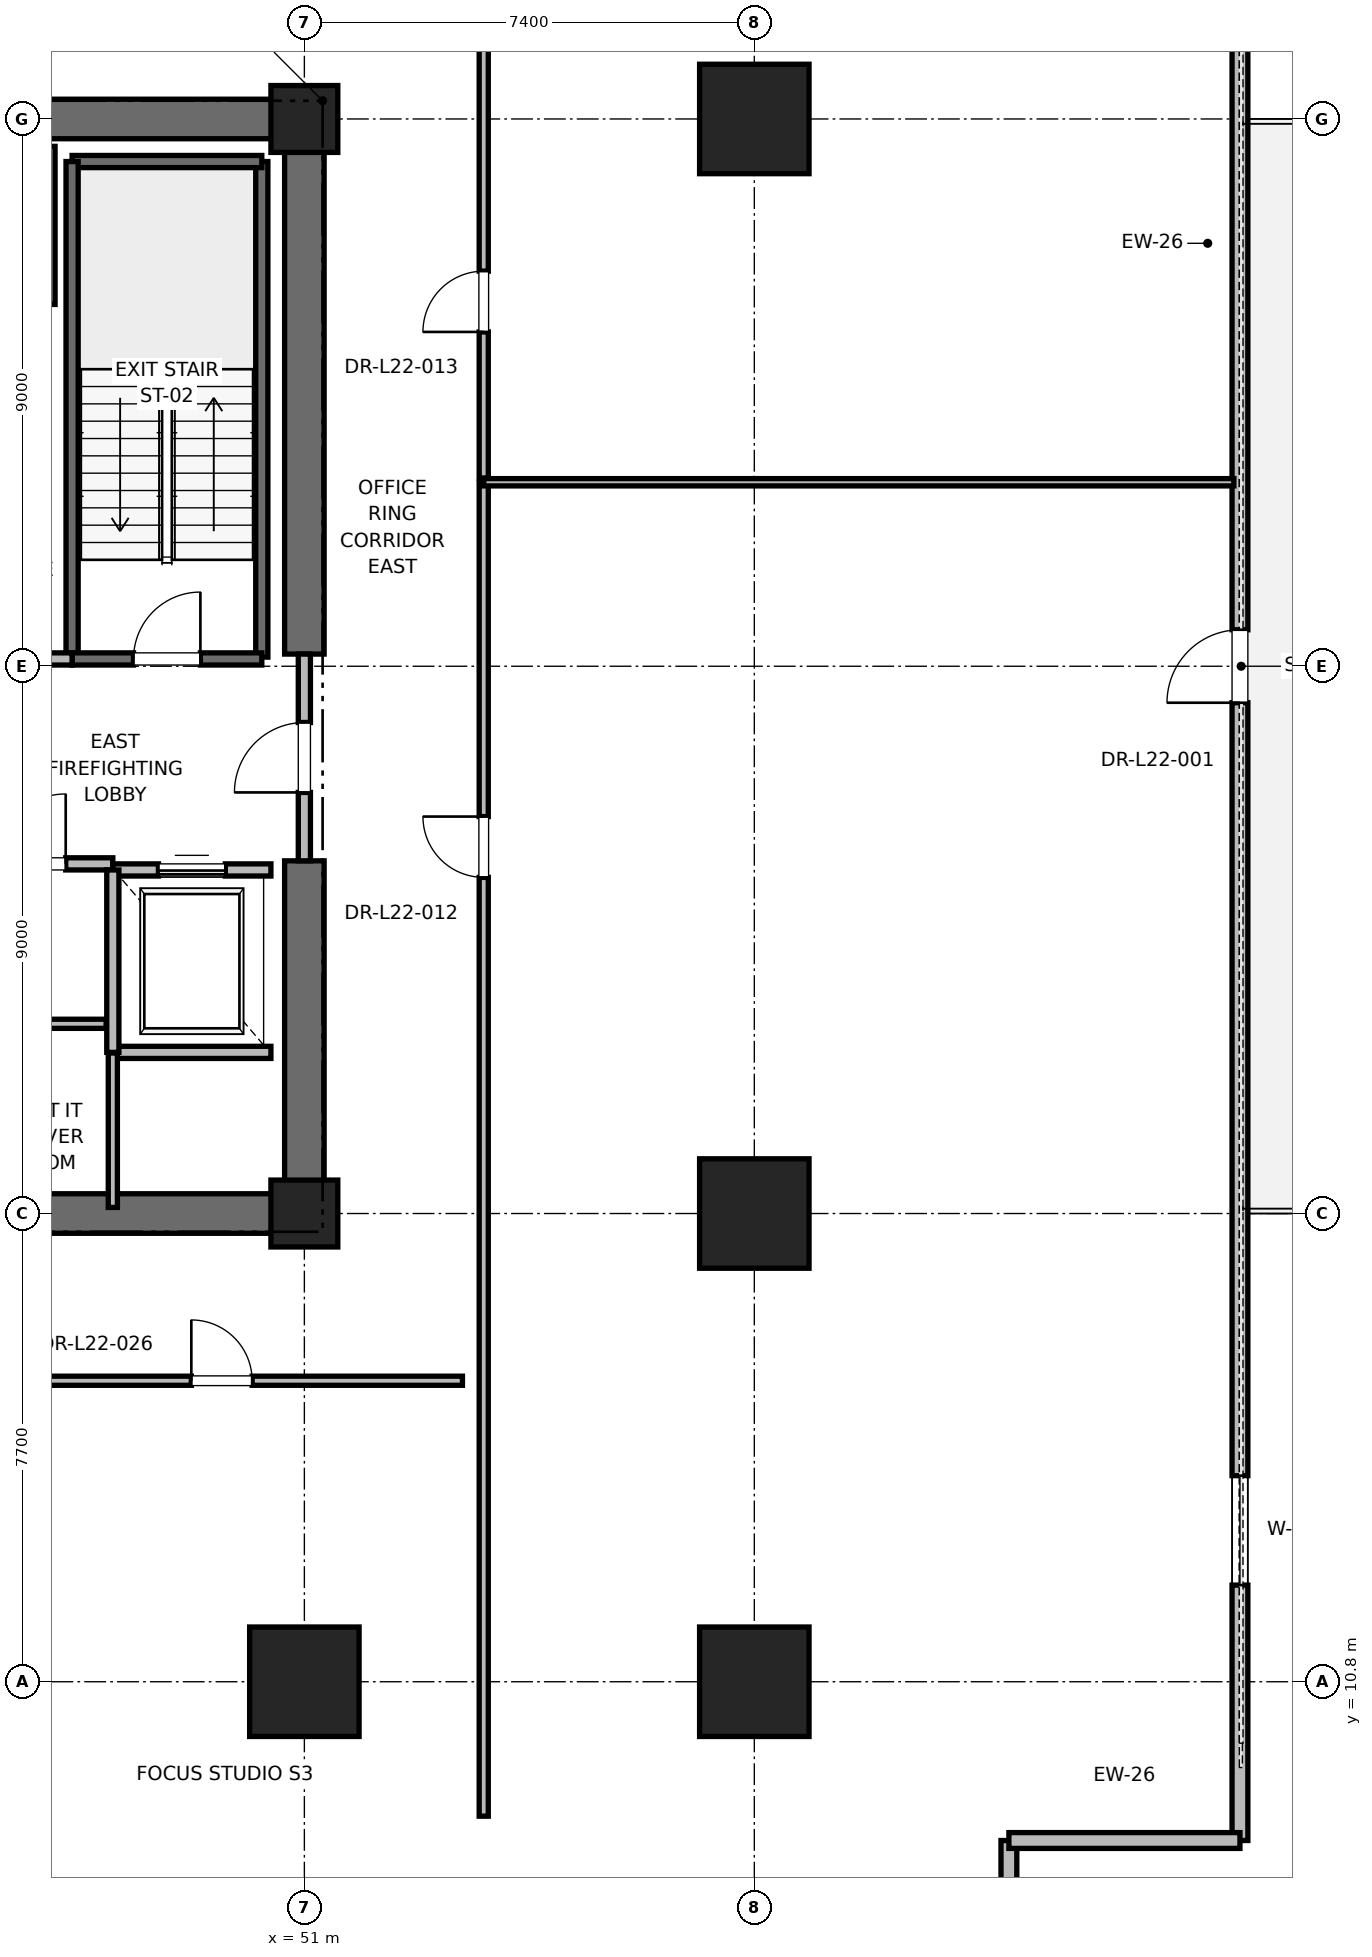
"""IFC4 building model, lengths in metres.
Left out: names, types, materials, properties, quantities, classifications, styles, units other than length and angle.
Written with IfcOpenShell. Run it as: python <this file> out.ifc"""

import sys

from ifc_helpers import new_model, si_unit, direction, frame, frame_2d, origin, origin_2d, place, context, subcontext, project, spatial, rectangle, extrude, element, fill, save


model = new_model("IFC4")
c1 = context("Model", 3, precision=1e-05, world=origin(), true_north=direction((0.0, 1.0)))
c2 = subcontext(c1, "Body", "Model", "MODEL_VIEW")
j1 = project(units=[si_unit("LENGTHUNIT", "METRE"), si_unit("PLANEANGLEUNIT", "RADIAN")], contexts=[c1])
p1 = place(None, origin())
s1 = spatial("IfcSite", under=j1, at=p1, CompositionType="ELEMENT")
p2 = place(p1, origin())
s2 = spatial("IfcBuilding", under=s1, at=p2, CompositionType="ELEMENT")
p3 = place(p2, frame((0.0, 0.0, 95.6)))
s3 = spatial("IfcBuildingStorey", under=s2, at=p3, CompositionType="ELEMENT", Elevation=95.6)
for number, where, z_axis, x_axis in (
    (1, (51.0, 10.8, 0.0), (0.0, 0.0, 1.0), (1.0, 0.0, 0.0)),
    (2, (58.4, 18.5, 0.0), (0.0, 0.0, 1.0), (1.0, 0.0, 0.0)),
    (3, (58.4, 36.5, 0.0), (0.0, 0.0, 1.0), (1.0, 0.0, 0.0)),
    (4, (58.4, 10.8, 0.0), (0.0, 0.0, 1.0), (1.0, 0.0, 0.0)),
):
    element("IfcColumn", number, at=place(p3, frame(where, z_axis=z_axis, x_axis=x_axis)), inside=s3, PredefinedType="COLUMN", context=c2, shape_type="SweptSolid", body=[
        extrude(rectangle(XDim=1.8, YDim=1.8, at=origin_2d()), origin(), (0.0, 0.0, 1.0), 4.0),
    ])
for number, where, z_axis, x_axis in (
    (5, (51.0, 18.5, 0.0), (0.0, 0.0, 1.0), (1.0, 0.0, 0.0)),
    (6, (51.0, 36.5, 0.0), (0.0, 0.0, 1.0), (1.0, 0.0, 0.0)),
):
    element("IfcColumn", number, at=place(p3, frame(where, z_axis=z_axis, x_axis=x_axis)), inside=s3, PredefinedType="PILASTER", context=c2, shape_type="SweptSolid", body=[
        extrude(rectangle(XDim=1.1, YDim=1.1, at=origin_2d()), origin(), (0.0, 0.0, 1.0), 4.0),
    ])
p4 = place(p3, frame((41.8, 18.5, 0.0), z_axis=(0.0, 0.0, 1.0), x_axis=(1.0, 0.0, 0.0)))
e7 = element("IfcWall", 7, at=p4, inside=s3, PredefinedType="SHEAR", context=c2, shape_type="SweptSolid", body=[
    extrude(rectangle(XDim=9.2, YDim=0.65, at=frame_2d((4.6, 0.0))), origin(), (0.0, 0.0, 1.0), 3.76),
])
for number, where, z_axis, x_axis in (
    (8, (45.2, 36.5, 0.0), (0.0, 0.0, 1.0), (1.0, 0.0, 0.0)),
    (9, (51.0, 18.5, 0.0), (0.0, 0.0, 1.0), (0.0, 1.0, 0.0)),
):
    element("IfcWall", number, at=place(p3, frame(where, z_axis=z_axis, x_axis=x_axis)), inside=s3, PredefinedType="SHEAR", context=c2, shape_type="SweptSolid", body=[
        extrude(rectangle(XDim=5.8, YDim=0.65, at=frame_2d((2.9, 0.0))), origin(), (0.0, 0.0, 1.0), 3.76),
    ])
p5 = place(p3, frame((51.0, 27.7, 0.0), z_axis=(0.0, 0.0, 1.0), x_axis=(0.0, 1.0, 0.0)))
e10 = element("IfcWall", 10, at=p5, inside=s3, PredefinedType="SHEAR", context=c2, shape_type="SweptSolid", body=[
    extrude(rectangle(XDim=8.8, YDim=0.65, at=frame_2d((4.4, 0.0))), origin(), (0.0, 0.0, 1.0), 3.76),
])
p6 = place(p3, frame((66.387, 8.189, 0.0), z_axis=(0.0, 0.0, 1.0), x_axis=(0.0, 1.0, 0.0)))
e11 = element("IfcWall", 11, at=p6, inside=s3, PredefinedType="PARAPET", context=c2, shape_type="SweptSolid", body=[
    extrude(rectangle(XDim=38.622, YDim=0.26, at=frame_2d((19.311, 0.0))), origin(), (0.0, 0.0, 1.0), 2.889),
])
p7 = place(p6, frame((4.2, 0.0, 0.85)))
e12 = element("IfcOpeningElement", 12, at=p7, cuts=e11, PredefinedType="OPENING", context=c2, shape_type="SweptSolid", body=[
    extrude(rectangle(XDim=1.8, YDim=2.2, at=frame_2d((0.9, 1.1))), frame((0.0, 0.13, 0.0), z_axis=(0.0, -1.0, 0.0), x_axis=(1.0, 0.0, 0.0)), (0.0, 0.0, 1.0), 0.26),
])
p8 = place(p6, frame((18.711, 0.0, 0.0)))
e13 = element("IfcOpeningElement", 13, at=p8, cuts=e11, PredefinedType="OPENING", context=c2, shape_type="SweptSolid", body=[
    extrude(rectangle(XDim=1.2, YDim=2.2, at=frame_2d((0.6, 1.1))), frame((0.0, 0.13, 0.0), z_axis=(0.0, -1.0, 0.0), x_axis=(1.0, 0.0, 0.0)), (0.0, 0.0, 1.0), 0.26),
])
p9 = place(p6, frame((32.622, 0.0, 0.85)))
e14 = element("IfcOpeningElement", 14, at=p9, cuts=e11, PredefinedType="OPENING", context=c2, shape_type="SweptSolid", body=[
    extrude(rectangle(XDim=1.8, YDim=2.2, at=frame_2d((0.9, 1.1))), frame((0.0, 0.13, 0.0), z_axis=(0.0, -1.0, 0.0), x_axis=(1.0, 0.0, 0.0)), (0.0, 0.0, 1.0), 0.26),
])
p10 = place(p3, frame((62.587, 4.789, 0.0), z_axis=(0.0, 0.0, 1.0), x_axis=(0.0, 1.0, 0.0)))
e15 = element("IfcWall", 15, at=p10, inside=s3, PredefinedType="PARAPET", context=c2, shape_type="SweptSolid", body=[
    extrude(rectangle(XDim=3.4, YDim=0.26, at=frame_2d((1.7, 0.0))), origin(), (0.0, 0.0, 1.0), 3.76),
])
p11 = place(p10, frame((0.8, 0.0, 0.85)))
e16 = element("IfcOpeningElement", 16, at=p11, cuts=e15, PredefinedType="OPENING", context=c2, shape_type="SweptSolid", body=[
    extrude(rectangle(XDim=1.8, YDim=2.2, at=frame_2d((0.9, 1.1))), frame((0.0, 0.13, 0.0), z_axis=(0.0, -1.0, 0.0), x_axis=(1.0, 0.0, 0.0)), (0.0, 0.0, 1.0), 0.26),
])
p12 = place(p3, frame((62.587, 8.189, 0.0), z_axis=(0.0, 0.0, 1.0), x_axis=(1.0, 0.0, 0.0)))
e17 = element("IfcWall", 17, at=p12, inside=s3, PredefinedType="PARAPET", context=c2, shape_type="SweptSolid", body=[
    extrude(rectangle(XDim=3.8, YDim=0.26, at=frame_2d((1.9, 0.0))), origin(), (0.0, 0.0, 1.0), 3.76),
])
p13 = place(p3, frame((50.3, 27.65, 0.0), z_axis=(0.0, 0.0, 1.0), x_axis=(0.0, 1.0, 0.0)))
e18 = element("IfcWall", 18, at=p13, inside=s3, PredefinedType="SOLIDWALL", context=c2, shape_type="SweptSolid", body=[
    extrude(rectangle(XDim=8.15, YDim=0.2, at=frame_2d((4.075, 0.0))), origin(), (0.0, 0.0, 1.0), 3.76),
])
p14 = place(p3, frame((47.18, 35.8, 0.0), z_axis=(0.0, 0.0, 1.0), x_axis=(1.0, 0.0, 0.0)))
e19 = element("IfcWall", 19, at=p14, inside=s3, PredefinedType="SOLIDWALL", context=c2, shape_type="SweptSolid", body=[
    extrude(rectangle(XDim=3.12, YDim=0.2, at=frame_2d((1.56, 0.0))), origin(), (0.0, 0.0, 1.0), 3.76),
])
p15 = place(p3, frame((47.18, 27.62, 0.0), z_axis=(0.0, 0.0, 1.0), x_axis=(0.0, 1.0, 0.0)))
e20 = element("IfcWall", 20, at=p15, inside=s3, PredefinedType="SOLIDWALL", context=c2, shape_type="SweptSolid", body=[
    extrude(rectangle(XDim=8.18, YDim=0.2, at=frame_2d((4.09, 0.0))), origin(), (0.0, 0.0, 1.0), 3.76),
])
p16 = place(p3, frame((47.18, 27.62, 0.0), z_axis=(0.0, 0.0, 1.0), x_axis=(1.0, 0.0, 0.0)))
e21 = element("IfcWall", 21, at=p16, inside=s3, PredefinedType="SOLIDWALL", context=c2, shape_type="SweptSolid", body=[
    extrude(rectangle(XDim=3.12, YDim=0.2, at=frame_2d((1.56, 0.0))), origin(), (0.0, 0.0, 1.0), 3.76),
])
p17 = place(p16, frame((1.01, 0.0, 0.0)))
e22 = element("IfcOpeningElement", 22, at=p17, cuts=e21, PredefinedType="OPENING", context=c2, shape_type="SweptSolid", body=[
    extrude(rectangle(XDim=1.1, YDim=2.15, at=frame_2d((0.55, 1.075))), frame((0.0, 0.1, 0.0), z_axis=(0.0, -1.0, 0.0), x_axis=(1.0, 0.0, 0.0)), (0.0, 0.0, 1.0), 0.2),
])
p18 = place(p3, frame((45.15, 24.25, 0.0), z_axis=(0.0, 0.0, 1.0), x_axis=(1.0, 0.0, 0.0)))
e23 = element("IfcWall", 23, at=p18, inside=s3, PredefinedType="PARTITIONING", context=c2, shape_type="SweptSolid", body=[
    extrude(rectangle(XDim=2.7, YDim=0.2, at=frame_2d((1.35, 0.0))), origin(), (0.0, 0.0, 1.0), 3.76),
])
p19 = place(p18, frame((0.775, 0.0, 0.0)))
e24 = element("IfcOpeningElement", 24, at=p19, cuts=e23, PredefinedType="OPENING", context=c2, shape_type="SweptSolid", body=[
    extrude(rectangle(XDim=1.15, YDim=2.2, at=frame_2d((0.575, 1.1))), frame((0.0, 0.1, 0.0), z_axis=(0.0, -1.0, 0.0), x_axis=(1.0, 0.0, 0.0)), (0.0, 0.0, 1.0), 0.2),
])
p20 = place(p3, frame((45.15, 27.62, 0.0), z_axis=(0.0, 0.0, 1.0), x_axis=(1.0, 0.0, 0.0)))
e25 = element("IfcWall", 25, at=p20, inside=s3, PredefinedType="PARTITIONING", context=c2, shape_type="SweptSolid", body=[
    extrude(rectangle(XDim=2.03, YDim=0.2, at=frame_2d((1.015, 0.0))), origin(), (0.0, 0.0, 1.0), 3.76),
])
p21 = place(p20, frame((0.44, 0.0, 0.0)))
e26 = element("IfcOpeningElement", 26, at=p21, cuts=e25, PredefinedType="OPENING", context=c2, shape_type="SweptSolid", body=[
    extrude(rectangle(XDim=1.15, YDim=2.2, at=frame_2d((0.575, 1.1))), frame((0.0, 0.1, 0.0), z_axis=(0.0, -1.0, 0.0), x_axis=(1.0, 0.0, 0.0)), (0.0, 0.0, 1.0), 0.2),
])
p22 = place(p3, frame((51.0, 24.3, 0.0), z_axis=(0.0, 0.0, 1.0), x_axis=(0.0, 1.0, 0.0)))
e27 = element("IfcWall", 27, at=p22, inside=s3, PredefinedType="PARTITIONING", context=c2, shape_type="SweptSolid", body=[
    extrude(rectangle(XDim=3.4, YDim=0.2, at=frame_2d((1.7, 0.0))), origin(), (0.0, 0.0, 1.0), 2.54),
])
p23 = place(p22, frame((1.125, 0.0, 0.0)))
e28 = element("IfcOpeningElement", 28, at=p23, cuts=e27, PredefinedType="OPENING", context=c2, shape_type="SweptSolid", body=[
    extrude(rectangle(XDim=1.15, YDim=2.2, at=frame_2d((0.575, 1.1))), frame((0.0, 0.1, 0.0), z_axis=(0.0, -1.0, 0.0), x_axis=(1.0, 0.0, 0.0)), (0.0, 0.0, 1.0), 0.2),
])
p24 = place(p3, frame((47.85, 21.15, 0.0), z_axis=(0.0, 0.0, 1.0), x_axis=(1.0, 0.0, 0.0)))
e29 = element("IfcWall", 29, at=p24, inside=s3, PredefinedType="SOLIDWALL", context=c2, shape_type="SweptSolid", body=[
    extrude(rectangle(XDim=2.6, YDim=0.2, at=frame_2d((1.3, 0.0))), origin(), (0.0, 0.0, 1.0), 3.76),
])
p25 = place(p3, frame((50.45, 24.15, 0.0), z_axis=(0.0, 0.0, 1.0), x_axis=(-1.0, 0.0, 0.0)))
e30 = element("IfcWall", 30, at=p25, inside=s3, PredefinedType="SOLIDWALL", context=c2, shape_type="SweptSolid", body=[
    extrude(rectangle(XDim=2.6, YDim=0.2, at=frame_2d((1.3, 0.0))), origin(), (0.0, 0.0, 1.0), 2.54),
])
p26 = place(p25, frame((0.75, 0.0, 0.0)))
e31 = element("IfcOpeningElement", 31, at=p26, cuts=e30, PredefinedType="OPENING", context=c2, shape_type="SweptSolid", body=[
    extrude(rectangle(XDim=1.1, YDim=2.2, at=frame_2d((0.55, 1.1))), frame((0.0, 0.1, 0.0), z_axis=(0.0, -1.0, 0.0), x_axis=(1.0, 0.0, 0.0)), (0.0, 0.0, 1.0), 0.2),
])
p27 = place(p3, frame((47.85, 24.15, 0.0), z_axis=(0.0, 0.0, 1.0), x_axis=(0.0, -1.0, 0.0)))
e32 = element("IfcWall", 32, at=p27, inside=s3, PredefinedType="SOLIDWALL", context=c2, shape_type="SweptSolid", body=[
    extrude(rectangle(XDim=3.0, YDim=0.2, at=frame_2d((1.5, 0.0))), origin(), (0.0, 0.0, 1.0), 3.76),
])
p28 = place(p3, frame((46.8, 33.45, 0.0), z_axis=(0.0, 0.0, 1.0), x_axis=(0.0, 1.0, 0.0)))
e33 = element("IfcWall", 33, at=p28, inside=s3, PredefinedType="SOLIDWALL", context=c2, shape_type="SweptSolid", body=[
    extrude(rectangle(XDim=2.6, YDim=0.2, at=frame_2d((1.3, 0.0))), origin(), (0.0, 0.0, 1.0), 3.76),
])
p29 = place(p3, frame((47.85, 18.6, 0.0), z_axis=(0.0, 0.0, 1.0), x_axis=(0.0, 1.0, 0.0)))
e34 = element("IfcWall", 34, at=p29, inside=s3, PredefinedType="PARTITIONING", context=c2, shape_type="SweptSolid", body=[
    extrude(rectangle(XDim=2.54, YDim=0.15, at=frame_2d((1.27, 0.0))), origin(), (0.0, 0.0, 1.0), 2.85),
])
p30 = place(p3, frame((44.8, 21.62, 0.0), z_axis=(0.0, 0.0, 1.0), x_axis=(1.0, 0.0, 0.0)))
e35 = element("IfcWall", 35, at=p30, inside=s3, PredefinedType="PARTITIONING", context=c2, shape_type="SweptSolid", body=[
    extrude(rectangle(XDim=2.94, YDim=0.15, at=frame_2d((1.47, 0.0))), origin(), (0.0, 0.0, 1.0), 2.85),
])
p31 = place(p30, frame((0.97, 0.0, 0.0)))
e36 = element("IfcOpeningElement", 36, at=p31, cuts=e35, PredefinedType="OPENING", context=c2, shape_type="SweptSolid", body=[
    extrude(rectangle(XDim=1.0, YDim=2.15, at=frame_2d((0.5, 1.075))), frame((0.0, 0.075, 0.0), z_axis=(0.0, -1.0, 0.0), x_axis=(1.0, 0.0, 0.0)), (0.0, 0.0, 1.0), 0.15),
])
p32 = place(p3, frame((45.782, 15.75, 0.0), z_axis=(0.0, 0.0, 1.0), x_axis=(1.0, 0.0, 0.0)))
e37 = element("IfcWall", 37, at=p32, inside=s3, PredefinedType="PARTITIONING", context=c2, shape_type="SweptSolid", body=[
    extrude(rectangle(XDim=7.818, YDim=0.15, at=frame_2d((3.909, 0.0))), origin(), (0.0, 0.0, 1.0), 2.85),
])
p33 = place(p32, frame((3.359, 0.0, 0.0)))
e38 = element("IfcOpeningElement", 38, at=p33, cuts=e37, PredefinedType="OPENING", context=c2, shape_type="SweptSolid", body=[
    extrude(rectangle(XDim=1.0, YDim=2.15, at=frame_2d((0.5, 1.075))), frame((0.0, 0.075, 0.0), z_axis=(0.0, -1.0, 0.0), x_axis=(1.0, 0.0, 0.0)), (0.0, 0.0, 1.0), 0.15),
])
p34 = place(p3, frame((53.95, 8.589, 0.0), z_axis=(0.0, 0.0, 1.0), x_axis=(0.0, 1.0, 0.0)))
e39 = element("IfcWall", 39, at=p34, inside=s3, PredefinedType="PARTITIONING", context=c2, shape_type="SweptSolid", body=[
    extrude(rectangle(XDim=21.937, YDim=0.15, at=frame_2d((10.968, 0.0))), origin(), (0.0, 0.0, 1.0), 2.85),
])
p35 = place(p34, frame((15.439, 0.0, 0.0)))
e40 = element("IfcOpeningElement", 40, at=p35, cuts=e39, PredefinedType="OPENING", context=c2, shape_type="SweptSolid", body=[
    extrude(rectangle(XDim=1.0, YDim=2.15, at=frame_2d((0.5, 1.075))), frame((0.0, 0.075, 0.0), z_axis=(0.0, -1.0, 0.0), x_axis=(1.0, 0.0, 0.0)), (0.0, 0.0, 1.0), 0.15),
])
p36 = place(p3, frame((53.95, 30.526, 0.0), z_axis=(0.0, 0.0, 1.0), x_axis=(1.0, 0.0, 0.0)))
e41 = element("IfcWall", 41, at=p36, inside=s3, PredefinedType="PARTITIONING", context=c2, shape_type="SweptSolid", body=[
    extrude(rectangle(XDim=12.337, YDim=0.12, at=frame_2d((6.168, 0.0))), origin(), (0.0, 0.0, 1.0), 2.85),
])
p37 = place(p3, frame((53.95, 30.596, 0.0), z_axis=(0.0, 0.0, 1.0), x_axis=(0.0, 1.0, 0.0)))
e42 = element("IfcWall", 42, at=p37, inside=s3, PredefinedType="PARTITIONING", context=c2, shape_type="SweptSolid", body=[
    extrude(rectangle(XDim=15.815, YDim=0.15, at=frame_2d((7.908, 0.0))), origin(), (0.0, 0.0, 1.0), 2.85),
])
p38 = place(p37, frame((2.402, 0.0, 0.0)))
e43 = element("IfcOpeningElement", 43, at=p38, cuts=e42, PredefinedType="OPENING", context=c2, shape_type="SweptSolid", body=[
    extrude(rectangle(XDim=1.0, YDim=2.15, at=frame_2d((0.5, 1.075))), frame((0.0, 0.075, 0.0), z_axis=(0.0, -1.0, 0.0), x_axis=(1.0, 0.0, 0.0)), (0.0, 0.0, 1.0), 0.15),
])
p39 = place(p7, origin())
e44 = element("IfcWindow", 44, at=p39, inside=s3, PartitioningType="SINGLE_PANEL", PredefinedType="WINDOW", context=c2, shape_type="SweptSolid", body=[
    extrude(rectangle(XDim=1.8, YDim=2.2, at=frame_2d((0.9, 1.1))), frame((0.0, 0.03, 0.0), z_axis=(0.0, -1.0, 0.0), x_axis=(1.0, 0.0, 0.0)), (0.0, 0.0, 1.0), 0.06),
])
fill(e12, e44)
p40 = place(p8, origin())
e45 = element("IfcDoor", 45, at=p40, inside=s3, OperationType="SINGLE_SWING_LEFT", PredefinedType="DOOR", context=c2, shape_type="SweptSolid", body=[
    extrude(rectangle(XDim=1.2, YDim=2.2, at=frame_2d((0.6, 1.1))), frame((0.0, 0.025, 0.0), z_axis=(0.0, -1.0, 0.0), x_axis=(1.0, 0.0, 0.0)), (0.0, 0.0, 1.0), 0.05),
])
fill(e13, e45)
p41 = place(p17, origin())
e46 = element("IfcDoor", 46, at=p41, inside=s3, OperationType="SINGLE_SWING_RIGHT", PredefinedType="DOOR", context=c2, shape_type="SweptSolid", body=[
    extrude(rectangle(XDim=1.1, YDim=2.15, at=frame_2d((0.55, 1.075))), frame((0.0, 0.025, 0.0), z_axis=(0.0, -1.0, 0.0), x_axis=(1.0, 0.0, 0.0)), (0.0, 0.0, 1.0), 0.05),
])
fill(e22, e46)
p42 = place(p19, origin())
e47 = element("IfcDoor", 47, at=p42, inside=s3, OperationType="SINGLE_SWING_RIGHT", PredefinedType="DOOR", context=c2, shape_type="SweptSolid", body=[
    extrude(rectangle(XDim=1.15, YDim=2.2, at=frame_2d((0.575, 1.1))), frame((0.0, 0.025, 0.0), z_axis=(0.0, -1.0, 0.0), x_axis=(1.0, 0.0, 0.0)), (0.0, 0.0, 1.0), 0.05),
])
fill(e24, e47)
p43 = place(p23, origin())
e48 = element("IfcDoor", 48, at=p43, inside=s3, OperationType="SINGLE_SWING_LEFT", PredefinedType="DOOR", context=c2, shape_type="SweptSolid", body=[
    extrude(rectangle(XDim=1.15, YDim=2.2, at=frame_2d((0.575, 1.1))), frame((0.0, 0.025, 0.0), z_axis=(0.0, -1.0, 0.0), x_axis=(1.0, 0.0, 0.0)), (0.0, 0.0, 1.0), 0.05),
])
fill(e28, e48)
p44 = place(p26, origin())
e49 = element("IfcDoor", 49, at=p44, inside=s3, OperationType="SLIDING_TO_RIGHT", PredefinedType="DOOR", context=c2, shape_type="SweptSolid", body=[
    extrude(rectangle(XDim=1.1, YDim=2.2, at=frame_2d((0.55, 1.1))), frame((0.0, 0.025, 0.0), z_axis=(0.0, -1.0, 0.0), x_axis=(1.0, 0.0, 0.0)), (0.0, 0.0, 1.0), 0.05),
])
fill(e31, e49)
p45 = place(p33, origin())
e50 = element("IfcDoor", 50, at=p45, inside=s3, OperationType="SINGLE_SWING_LEFT", PredefinedType="DOOR", context=c2, shape_type="SweptSolid", body=[
    extrude(rectangle(XDim=1.0, YDim=2.15, at=frame_2d((0.5, 1.075))), frame((0.0, 0.025, 0.0), z_axis=(0.0, -1.0, 0.0), x_axis=(1.0, 0.0, 0.0)), (0.0, 0.0, 1.0), 0.05),
])
fill(e38, e50)
p46 = place(p35, origin())
e51 = element("IfcDoor", 51, at=p46, inside=s3, OperationType="SINGLE_SWING_RIGHT", PredefinedType="DOOR", context=c2, shape_type="SweptSolid", body=[
    extrude(rectangle(XDim=1.0, YDim=2.15, at=frame_2d((0.5, 1.075))), frame((0.0, 0.025, 0.0), z_axis=(0.0, -1.0, 0.0), x_axis=(1.0, 0.0, 0.0)), (0.0, 0.0, 1.0), 0.05),
])
fill(e40, e51)
p47 = place(p38, origin())
e52 = element("IfcDoor", 52, at=p47, inside=s3, OperationType="SINGLE_SWING_LEFT", PredefinedType="DOOR", context=c2, shape_type="SweptSolid", body=[
    extrude(rectangle(XDim=1.0, YDim=2.15, at=frame_2d((0.5, 1.075))), frame((0.0, 0.025, 0.0), z_axis=(0.0, -1.0, 0.0), x_axis=(1.0, 0.0, 0.0)), (0.0, 0.0, 1.0), 0.05),
])
fill(e43, e52)
save(model, sys.argv[1])
